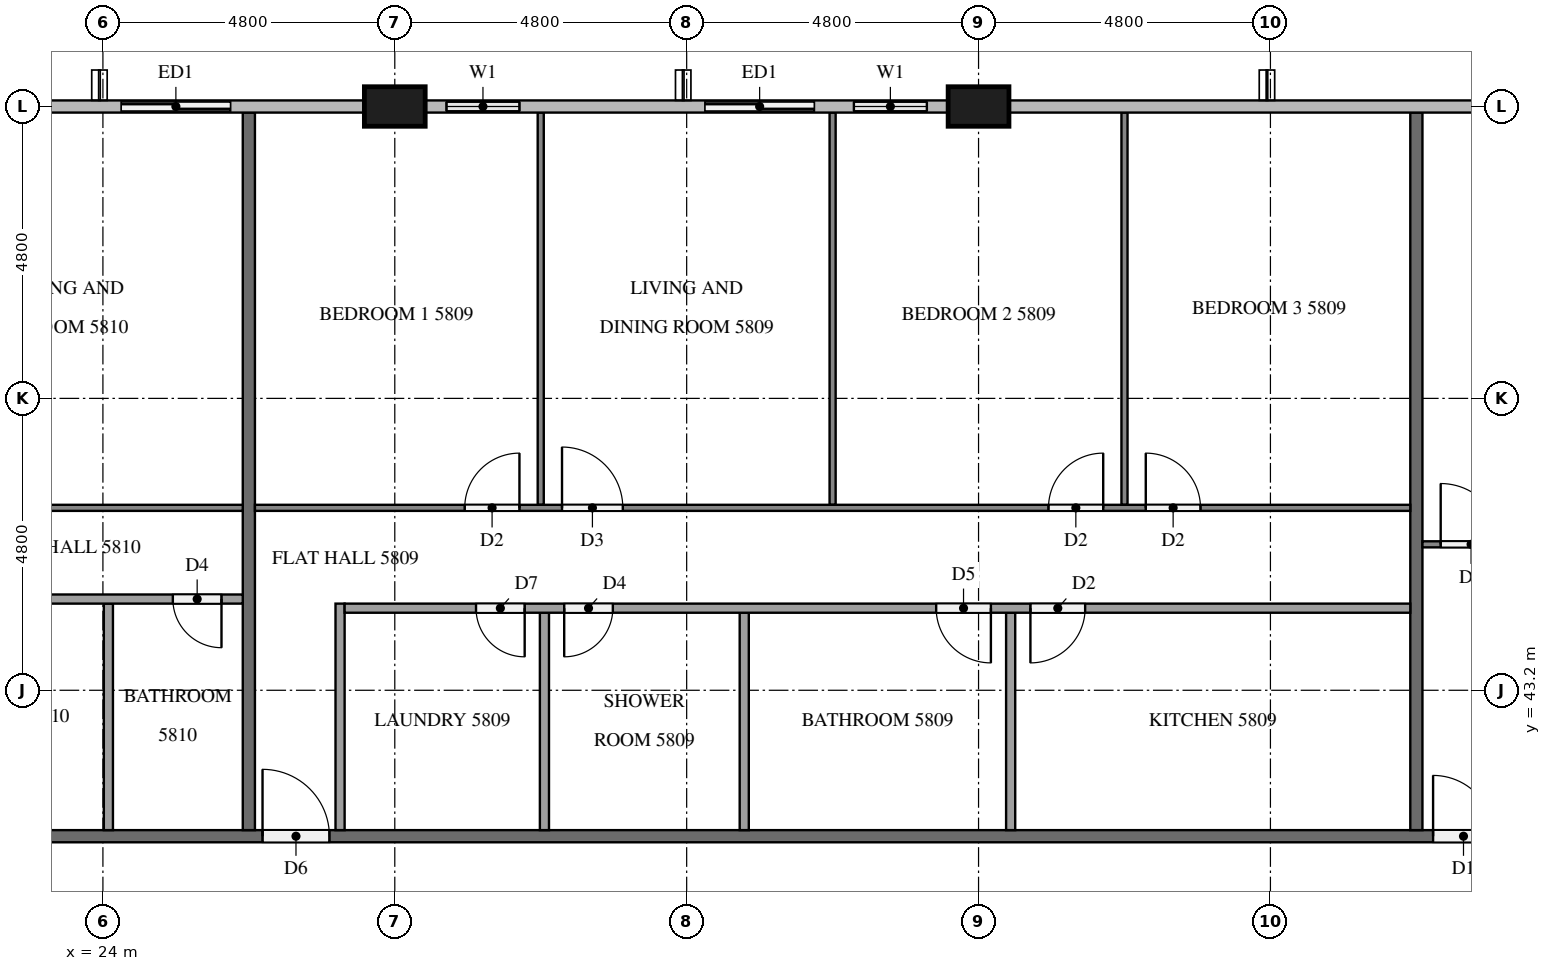
"""IFC4 building model, lengths in metres.
Left out: names, types, materials, properties, quantities, classifications, styles, units other than length and angle.
Written with IfcOpenShell. Run it as: python <this file> out.ifc"""

import sys

from ifc_helpers import new_model, si_unit, direction, frame, frame_2d, origin, origin_2d, place, context, subcontext, project, spatial, rectangle, extrude, element, fill, save


model = new_model("IFC4")
c1 = context("Model", 3, precision=1e-05, world=origin(), true_north=direction((0.0, 1.0)))
c2 = subcontext(c1, "Body", "Model", "MODEL_VIEW")
j1 = project(units=[si_unit("LENGTHUNIT", "METRE"), si_unit("PLANEANGLEUNIT", "RADIAN")], contexts=[c1])
p1 = place(None, origin())
s1 = spatial("IfcSite", under=j1, at=p1, CompositionType="ELEMENT")
p2 = place(p1, origin())
s2 = spatial("IfcBuilding", under=s1, at=p2, CompositionType="ELEMENT")
p3 = place(p2, frame((0.0, 0.0, 222.8)))
s3 = spatial("IfcBuildingStorey", under=s2, at=p3, CompositionType="ELEMENT", Elevation=222.8)
for number, where, z_axis, x_axis in (
    (1, (38.4, 52.8, 0.0), (0.0, 0.0, 1.0), (1.0, 0.0, 0.0)),
    (2, (28.8, 52.8, 0.0), (0.0, 0.0, 1.0), (1.0, 0.0, 0.0)),
):
    element("IfcColumn", number, at=place(p3, frame(where, z_axis=z_axis, x_axis=x_axis)), inside=s3, PredefinedType="COLUMN", context=c2, shape_type="SweptSolid", body=[
        extrude(rectangle(XDim=1.0, YDim=0.65, at=origin_2d()), origin(), (0.0, 0.0, 1.0), 3.2),
    ])
p4 = place(p3, frame((37.9, 52.8, 0.0), z_axis=(0.0, 0.0, 1.0), x_axis=(-1.0, 0.0, 0.0)))
e3 = element("IfcWall", 3, at=p4, inside=s3, PredefinedType="SOLIDWALL", context=c2, shape_type="SweptSolid", body=[
    extrude(rectangle(XDim=4.3, YDim=0.15, at=frame_2d((2.15, 0.0))), origin(), (0.0, 0.0, 1.0), 3.2),
])
p5 = place(p4, frame((0.35, 0.0, 0.9)))
e4 = element("IfcOpeningElement", 4, at=p5, cuts=e3, PredefinedType="OPENING", context=c2, shape_type="SweptSolid", body=[
    extrude(rectangle(XDim=1.2, YDim=1.4, at=frame_2d((0.6, 0.7))), frame((0.0, 0.085, 0.0), z_axis=(0.0, -1.0, 0.0), x_axis=(1.0, 0.0, 0.0)), (0.0, 0.0, 1.0), 0.17),
])
p6 = place(p4, frame((2.2, 0.0, 0.0)))
e5 = element("IfcOpeningElement", 5, at=p6, cuts=e3, PredefinedType="OPENING", context=c2, shape_type="SweptSolid", body=[
    extrude(rectangle(XDim=1.8, YDim=2.4, at=frame_2d((0.9, 1.2))), frame((0.0, 0.085, 0.0), z_axis=(0.0, -1.0, 0.0), x_axis=(1.0, 0.0, 0.0)), (0.0, 0.0, 1.0), 0.17),
])
p7 = place(p3, frame((31.2, 52.8, 0.0), z_axis=(0.0, 0.0, 1.0), x_axis=(-1.0, 0.0, 0.0)))
e6 = element("IfcWall", 6, at=p7, inside=s3, PredefinedType="SOLIDWALL", context=c2, shape_type="SweptSolid", body=[
    extrude(rectangle(XDim=1.9, YDim=0.15, at=frame_2d((0.95, 0.0))), origin(), (0.0, 0.0, 1.0), 3.2),
])
p8 = place(p7, frame((0.35, 0.0, 0.9)))
e7 = element("IfcOpeningElement", 7, at=p8, cuts=e6, PredefinedType="OPENING", context=c2, shape_type="SweptSolid", body=[
    extrude(rectangle(XDim=1.2, YDim=1.4, at=frame_2d((0.6, 0.7))), frame((0.0, 0.085, 0.0), z_axis=(0.0, -1.0, 0.0), x_axis=(1.0, 0.0, 0.0)), (0.0, 0.0, 1.0), 0.17),
])
p9 = place(p3, frame((26.4, 52.8, 0.0), z_axis=(0.0, 0.0, 1.0), x_axis=(-1.0, 0.0, 0.0)))
e8 = element("IfcWall", 8, at=p9, inside=s3, PredefinedType="SOLIDWALL", context=c2, shape_type="SweptSolid", body=[
    extrude(rectangle(XDim=2.4, YDim=0.15, at=frame_2d((1.2, 0.0))), origin(), (0.0, 0.0, 1.0), 3.2),
])
p10 = place(p9, frame((0.3, 0.0, 0.0)))
e9 = element("IfcOpeningElement", 9, at=p10, cuts=e8, PredefinedType="OPENING", context=c2, shape_type="SweptSolid", body=[
    extrude(rectangle(XDim=1.8, YDim=2.4, at=frame_2d((0.9, 1.2))), frame((0.0, 0.085, 0.0), z_axis=(0.0, -1.0, 0.0), x_axis=(1.0, 0.0, 0.0)), (0.0, 0.0, 1.0), 0.17),
])
p11 = place(p3, frame((11.9, 40.8, 0.0), z_axis=(0.0, 0.0, 1.0), x_axis=(1.0, 0.0, 0.0)))
e10 = element("IfcWall", 10, at=p11, inside=s3, PredefinedType="PARTITIONING", context=c2, shape_type="SweptSolid", body=[
    extrude(rectangle(XDim=38.6, YDim=0.2, at=frame_2d((19.3, 0.0))), origin(), (0.0, 0.0, 1.0), 3.2),
])
p12 = place(p11, frame((33.975, 0.0, 0.0)))
e11 = element("IfcOpeningElement", 11, at=p12, cuts=e10, PredefinedType="OPENING", context=c2, shape_type="SweptSolid", body=[
    extrude(rectangle(XDim=1.0, YDim=2.1, at=frame_2d((0.5, 1.05))), frame((0.0, 0.11, 0.0), z_axis=(0.0, -1.0, 0.0), x_axis=(1.0, 0.0, 0.0)), (0.0, 0.0, 1.0), 0.22),
])
p13 = place(p11, frame((14.725, 0.0, 0.0)))
e12 = element("IfcOpeningElement", 12, at=p13, cuts=e10, PredefinedType="OPENING", context=c2, shape_type="SweptSolid", body=[
    extrude(rectangle(XDim=1.1, YDim=2.1, at=frame_2d((0.55, 1.05))), frame((0.0, 0.11, 0.0), z_axis=(0.0, -1.0, 0.0), x_axis=(1.0, 0.0, 0.0)), (0.0, 0.0, 1.0), 0.22),
])
p14 = place(p11, frame((7.575, 0.0, 0.0)))
e13 = element("IfcOpeningElement", 13, at=p14, cuts=e10, PredefinedType="OPENING", context=c2, shape_type="SweptSolid", body=[
    extrude(rectangle(XDim=1.0, YDim=2.1, at=frame_2d((0.5, 1.05))), frame((0.0, 0.11, 0.0), z_axis=(0.0, -1.0, 0.0), x_axis=(1.0, 0.0, 0.0)), (0.0, 0.0, 1.0), 0.22),
])
p15 = place(p11, frame((6.025, 0.0, 0.0)))
e14 = element("IfcOpeningElement", 14, at=p15, cuts=e10, PredefinedType="OPENING", context=c2, shape_type="SweptSolid", body=[
    extrude(rectangle(XDim=1.0, YDim=2.1, at=frame_2d((0.5, 1.05))), frame((0.0, 0.11, 0.0), z_axis=(0.0, -1.0, 0.0), x_axis=(1.0, 0.0, 0.0)), (0.0, 0.0, 1.0), 0.22),
])
for number, where, z_axis, x_axis in (
    (15, (45.6, 52.7, 0.0), (0.0, 0.0, 1.0), (0.0, -1.0, 0.0)),
    (16, (26.4, 52.7, 0.0), (0.0, 0.0, 1.0), (0.0, -1.0, 0.0)),
):
    element("IfcWall", number, at=place(p3, frame(where, z_axis=z_axis, x_axis=x_axis)), inside=s3, PredefinedType="PARTITIONING", context=c2, shape_type="SweptSolid", body=[
        extrude(rectangle(XDim=11.8, YDim=0.2, at=frame_2d((5.9, 0.0))), origin(), (0.0, 0.0, 1.0), 3.2),
    ])
p16 = place(p3, frame((45.7, 45.6, 0.0), z_axis=(0.0, 0.0, 1.0), x_axis=(1.0, 0.0, 0.0)))
e17 = element("IfcWall", 17, at=p16, inside=s3, PredefinedType="PARTITIONING", context=c2, shape_type="SweptSolid", body=[
    extrude(rectangle(XDim=16.6, YDim=0.1, at=frame_2d((8.3, 0.0))), origin(), (0.0, 0.0, 1.0), 3.2),
])
p17 = place(p16, frame((0.3, 0.0, 0.0)))
e18 = element("IfcOpeningElement", 18, at=p17, cuts=e17, PredefinedType="OPENING", context=c2, shape_type="SweptSolid", body=[
    extrude(rectangle(XDim=1.0, YDim=2.1, at=frame_2d((0.5, 1.05))), frame((0.0, 0.06, 0.0), z_axis=(0.0, -1.0, 0.0), x_axis=(1.0, 0.0, 0.0)), (0.0, 0.0, 1.0), 0.12),
])
p18 = place(p16, frame((10.65, 0.0, 0.0)))
e19 = element("IfcOpeningElement", 19, at=p18, cuts=e17, PredefinedType="OPENING", context=c2, shape_type="SweptSolid", body=[
    extrude(rectangle(XDim=0.9, YDim=2.1, at=frame_2d((0.45, 1.05))), frame((0.0, 0.06, 0.0), z_axis=(0.0, -1.0, 0.0), x_axis=(1.0, 0.0, 0.0)), (0.0, 0.0, 1.0), 0.12),
])
p19 = place(p16, frame((12.25, 0.0, 0.0)))
e20 = element("IfcOpeningElement", 20, at=p19, cuts=e17, PredefinedType="OPENING", context=c2, shape_type="SweptSolid", body=[
    extrude(rectangle(XDim=0.9, YDim=2.1, at=frame_2d((0.45, 1.05))), frame((0.0, 0.06, 0.0), z_axis=(0.0, -1.0, 0.0), x_axis=(1.0, 0.0, 0.0)), (0.0, 0.0, 1.0), 0.12),
])
for number, where, z_axis, x_axis in (
    (21, (31.2, 46.25, 0.0), (0.0, 0.0, 1.0), (0.0, 1.0, 0.0)),
    (22, (36.0, 46.25, 0.0), (0.0, 0.0, 1.0), (0.0, 1.0, 0.0)),
    (23, (40.8, 46.25, 0.0), (0.0, 0.0, 1.0), (0.0, 1.0, 0.0)),
):
    element("IfcWall", number, at=place(p3, frame(where, z_axis=z_axis, x_axis=x_axis)), inside=s3, PredefinedType="PARTITIONING", context=c2, shape_type="SweptSolid", body=[
        extrude(rectangle(XDim=6.45, YDim=0.1, at=frame_2d((3.225, 0.0))), origin(), (0.0, 0.0, 1.0), 3.2),
    ])
p20 = place(p3, frame((26.5, 46.2, 0.0), z_axis=(0.0, 0.0, 1.0), x_axis=(1.0, 0.0, 0.0)))
e24 = element("IfcWall", 24, at=p20, inside=s3, PredefinedType="PARTITIONING", context=c2, shape_type="SweptSolid", body=[
    extrude(rectangle(XDim=19.0, YDim=0.1, at=frame_2d((9.5, 0.0))), origin(), (0.0, 0.0, 1.0), 3.2),
])
p21 = place(p20, frame((3.45, 0.0, 0.0)))
e25 = element("IfcOpeningElement", 25, at=p21, cuts=e24, PredefinedType="OPENING", context=c2, shape_type="SweptSolid", body=[
    extrude(rectangle(XDim=0.9, YDim=2.1, at=frame_2d((0.45, 1.05))), frame((0.0, 0.06, 0.0), z_axis=(0.0, -1.0, 0.0), x_axis=(1.0, 0.0, 0.0)), (0.0, 0.0, 1.0), 0.12),
])
p22 = place(p20, frame((5.05, 0.0, 0.0)))
e26 = element("IfcOpeningElement", 26, at=p22, cuts=e24, PredefinedType="OPENING", context=c2, shape_type="SweptSolid", body=[
    extrude(rectangle(XDim=1.0, YDim=2.1, at=frame_2d((0.5, 1.05))), frame((0.0, 0.06, 0.0), z_axis=(0.0, -1.0, 0.0), x_axis=(1.0, 0.0, 0.0)), (0.0, 0.0, 1.0), 0.12),
])
p23 = place(p20, frame((13.05, 0.0, 0.0)))
e27 = element("IfcOpeningElement", 27, at=p23, cuts=e24, PredefinedType="OPENING", context=c2, shape_type="SweptSolid", body=[
    extrude(rectangle(XDim=0.9, YDim=2.1, at=frame_2d((0.45, 1.05))), frame((0.0, 0.06, 0.0), z_axis=(0.0, -1.0, 0.0), x_axis=(1.0, 0.0, 0.0)), (0.0, 0.0, 1.0), 0.12),
])
p24 = place(p20, frame((14.65, 0.0, 0.0)))
e28 = element("IfcOpeningElement", 28, at=p24, cuts=e24, PredefinedType="OPENING", context=c2, shape_type="SweptSolid", body=[
    extrude(rectangle(XDim=0.9, YDim=2.1, at=frame_2d((0.45, 1.05))), frame((0.0, 0.06, 0.0), z_axis=(0.0, -1.0, 0.0), x_axis=(1.0, 0.0, 0.0)), (0.0, 0.0, 1.0), 0.12),
])
for number, where, z_axis, x_axis in (
    (29, (31.261, 40.9, 0.0), (0.0, 0.0, 1.0), (0.0, 1.0, 0.0)),
    (30, (34.547, 40.9, 0.0), (0.0, 0.0, 1.0), (0.0, 1.0, 0.0)),
    (31, (38.928, 40.9, 0.0), (0.0, 0.0, 1.0), (0.0, 1.0, 0.0)),
):
    element("IfcWall", number, at=place(p3, frame(where, z_axis=z_axis, x_axis=x_axis)), inside=s3, PredefinedType="PARTITIONING", context=c2, shape_type="SweptSolid", body=[
        extrude(rectangle(XDim=3.575, YDim=0.15, at=frame_2d((1.788, 0.0))), origin(), (0.0, 0.0, 1.0), 3.2),
    ])
p25 = place(p3, frame((27.9, 40.9, 0.0), z_axis=(0.0, 0.0, 1.0), x_axis=(0.0, 1.0, 0.0)))
e32 = element("IfcWall", 32, at=p25, inside=s3, PredefinedType="PARTITIONING", context=c2, shape_type="SweptSolid", body=[
    extrude(rectangle(XDim=3.725, YDim=0.15, at=frame_2d((1.863, 0.0))), origin(), (0.0, 0.0, 1.0), 3.2),
])
p26 = place(p3, frame((45.5, 44.55, 0.0), z_axis=(0.0, 0.0, 1.0), x_axis=(-1.0, 0.0, 0.0)))
e33 = element("IfcWall", 33, at=p26, inside=s3, PredefinedType="PARTITIONING", context=c2, shape_type="SweptSolid", body=[
    extrude(rectangle(XDim=17.525, YDim=0.15, at=frame_2d((8.762, 0.0))), origin(), (0.0, 0.0, 1.0), 3.2),
])
p27 = place(p26, frame((14.564, 0.0, 0.0)))
e34 = element("IfcOpeningElement", 34, at=p27, cuts=e33, PredefinedType="OPENING", context=c2, shape_type="SweptSolid", body=[
    extrude(rectangle(XDim=0.8, YDim=2.1, at=frame_2d((0.4, 1.05))), frame((0.0, 0.085, 0.0), z_axis=(0.0, -1.0, 0.0), x_axis=(1.0, 0.0, 0.0)), (0.0, 0.0, 1.0), 0.17),
])
p28 = place(p26, frame((13.114, 0.0, 0.0)))
e35 = element("IfcOpeningElement", 35, at=p28, cuts=e33, PredefinedType="OPENING", context=c2, shape_type="SweptSolid", body=[
    extrude(rectangle(XDim=0.8, YDim=2.1, at=frame_2d((0.4, 1.05))), frame((0.0, 0.085, 0.0), z_axis=(0.0, -1.0, 0.0), x_axis=(1.0, 0.0, 0.0)), (0.0, 0.0, 1.0), 0.17),
])
p29 = place(p26, frame((6.897, 0.0, 0.0)))
e36 = element("IfcOpeningElement", 36, at=p29, cuts=e33, PredefinedType="OPENING", context=c2, shape_type="SweptSolid", body=[
    extrude(rectangle(XDim=0.9, YDim=2.1, at=frame_2d((0.45, 1.05))), frame((0.0, 0.085, 0.0), z_axis=(0.0, -1.0, 0.0), x_axis=(1.0, 0.0, 0.0)), (0.0, 0.0, 1.0), 0.17),
])
p30 = place(p26, frame((5.347, 0.0, 0.0)))
e37 = element("IfcOpeningElement", 37, at=p30, cuts=e33, PredefinedType="OPENING", context=c2, shape_type="SweptSolid", body=[
    extrude(rectangle(XDim=0.9, YDim=2.1, at=frame_2d((0.45, 1.05))), frame((0.0, 0.085, 0.0), z_axis=(0.0, -1.0, 0.0), x_axis=(1.0, 0.0, 0.0)), (0.0, 0.0, 1.0), 0.17),
])
p31 = place(p3, frame((19.3, 46.2, 0.0), z_axis=(0.0, 0.0, 1.0), x_axis=(1.0, 0.0, 0.0)))
e38 = element("IfcWall", 38, at=p31, inside=s3, PredefinedType="PARTITIONING", context=c2, shape_type="SweptSolid", body=[
    extrude(rectangle(XDim=7.0, YDim=0.1, at=frame_2d((3.5, 0.0))), origin(), (0.0, 0.0, 1.0), 3.2),
])
p32 = place(p31, frame((0.3, 0.0, 0.0)))
e39 = element("IfcOpeningElement", 39, at=p32, cuts=e38, PredefinedType="OPENING", context=c2, shape_type="SweptSolid", body=[
    extrude(rectangle(XDim=1.0, YDim=2.1, at=frame_2d((0.5, 1.05))), frame((0.0, 0.06, 0.0), z_axis=(0.0, -1.0, 0.0), x_axis=(1.0, 0.0, 0.0)), (0.0, 0.0, 1.0), 0.12),
])
p33 = place(p3, frame((24.09, 40.9, 0.0), z_axis=(0.0, 0.0, 1.0), x_axis=(0.0, 1.0, 0.0)))
e40 = element("IfcWall", 40, at=p33, inside=s3, PredefinedType="PARTITIONING", context=c2, shape_type="SweptSolid", body=[
    extrude(rectangle(XDim=3.725, YDim=0.15, at=frame_2d((1.863, 0.0))), origin(), (0.0, 0.0, 1.0), 3.2),
])
p34 = place(p3, frame((26.3, 44.7, 0.0), z_axis=(0.0, 0.0, 1.0), x_axis=(-1.0, 0.0, 0.0)))
e41 = element("IfcWall", 41, at=p34, inside=s3, PredefinedType="PARTITIONING", context=c2, shape_type="SweptSolid", body=[
    extrude(rectangle(XDim=5.525, YDim=0.15, at=frame_2d((2.763, 0.0))), origin(), (0.0, 0.0, 1.0), 3.2),
])
p35 = place(p34, frame((4.325, 0.0, 0.0)))
e42 = element("IfcOpeningElement", 42, at=p35, cuts=e41, PredefinedType="OPENING", context=c2, shape_type="SweptSolid", body=[
    extrude(rectangle(XDim=0.9, YDim=2.1, at=frame_2d((0.45, 1.05))), frame((0.0, 0.085, 0.0), z_axis=(0.0, -1.0, 0.0), x_axis=(1.0, 0.0, 0.0)), (0.0, 0.0, 1.0), 0.17),
])
p36 = place(p34, frame((0.35, 0.0, 0.0)))
e43 = element("IfcOpeningElement", 43, at=p36, cuts=e41, PredefinedType="OPENING", context=c2, shape_type="SweptSolid", body=[
    extrude(rectangle(XDim=0.8, YDim=2.1, at=frame_2d((0.4, 1.05))), frame((0.0, 0.085, 0.0), z_axis=(0.0, -1.0, 0.0), x_axis=(1.0, 0.0, 0.0)), (0.0, 0.0, 1.0), 0.17),
])
p37 = place(p5, origin())
e44 = element("IfcWindow", 44, at=p37, inside=s3, PartitioningType="SINGLE_PANEL", PredefinedType="WINDOW", context=c2, shape_type="SweptSolid", body=[
    extrude(rectangle(XDim=1.2, YDim=1.4, at=frame_2d((0.6, 0.7))), frame((0.0, 0.03, 0.0), z_axis=(0.0, -1.0, 0.0), x_axis=(1.0, 0.0, 0.0)), (0.0, 0.0, 1.0), 0.06),
])
fill(e4, e44)
p38 = place(p6, origin())
e45 = element("IfcDoor", 45, at=p38, inside=s3, OperationType="SLIDING_TO_LEFT", PredefinedType="DOOR", context=c2, shape_type="SweptSolid", body=[
    extrude(rectangle(XDim=1.8, YDim=2.4, at=frame_2d((0.9, 1.2))), frame((0.0, 0.025, 0.0), z_axis=(0.0, -1.0, 0.0), x_axis=(1.0, 0.0, 0.0)), (0.0, 0.0, 1.0), 0.05),
])
fill(e5, e45)
p39 = place(p8, origin())
e46 = element("IfcWindow", 46, at=p39, inside=s3, PartitioningType="SINGLE_PANEL", PredefinedType="WINDOW", context=c2, shape_type="SweptSolid", body=[
    extrude(rectangle(XDim=1.2, YDim=1.4, at=frame_2d((0.6, 0.7))), frame((0.0, 0.03, 0.0), z_axis=(0.0, -1.0, 0.0), x_axis=(1.0, 0.0, 0.0)), (0.0, 0.0, 1.0), 0.06),
])
fill(e7, e46)
p40 = place(p10, origin())
e47 = element("IfcDoor", 47, at=p40, inside=s3, OperationType="SLIDING_TO_RIGHT", PredefinedType="DOOR", context=c2, shape_type="SweptSolid", body=[
    extrude(rectangle(XDim=1.8, YDim=2.4, at=frame_2d((0.9, 1.2))), frame((0.0, 0.025, 0.0), z_axis=(0.0, -1.0, 0.0), x_axis=(1.0, 0.0, 0.0)), (0.0, 0.0, 1.0), 0.05),
])
fill(e9, e47)
p41 = place(p12, origin())
e48 = element("IfcDoor", 48, at=p41, inside=s3, OperationType="SINGLE_SWING_LEFT", PredefinedType="DOOR", context=c2, shape_type="SweptSolid", body=[
    extrude(rectangle(XDim=1.0, YDim=2.1, at=frame_2d((0.5, 1.05))), frame((0.0, 0.025, 0.0), z_axis=(0.0, -1.0, 0.0), x_axis=(1.0, 0.0, 0.0)), (0.0, 0.0, 1.0), 0.05),
])
fill(e11, e48)
p42 = place(p13, origin())
e49 = element("IfcDoor", 49, at=p42, inside=s3, OperationType="SINGLE_SWING_LEFT", PredefinedType="DOOR", context=c2, shape_type="SweptSolid", body=[
    extrude(rectangle(XDim=1.1, YDim=2.1, at=frame_2d((0.55, 1.05))), frame((0.0, 0.025, 0.0), z_axis=(0.0, -1.0, 0.0), x_axis=(1.0, 0.0, 0.0)), (0.0, 0.0, 1.0), 0.05),
])
fill(e12, e49)
p43 = place(p17, origin())
e50 = element("IfcDoor", 50, at=p43, inside=s3, OperationType="SINGLE_SWING_LEFT", PredefinedType="DOOR", context=c2, shape_type="SweptSolid", body=[
    extrude(rectangle(XDim=1.0, YDim=2.1, at=frame_2d((0.5, 1.05))), frame((0.0, 0.025, 0.0), z_axis=(0.0, -1.0, 0.0), x_axis=(1.0, 0.0, 0.0)), (0.0, 0.0, 1.0), 0.05),
])
fill(e18, e50)
p44 = place(p21, origin())
e51 = element("IfcDoor", 51, at=p44, inside=s3, OperationType="SINGLE_SWING_RIGHT", PredefinedType="DOOR", context=c2, shape_type="SweptSolid", body=[
    extrude(rectangle(XDim=0.9, YDim=2.1, at=frame_2d((0.45, 1.05))), frame((0.0, 0.025, 0.0), z_axis=(0.0, -1.0, 0.0), x_axis=(1.0, 0.0, 0.0)), (0.0, 0.0, 1.0), 0.05),
])
fill(e25, e51)
p45 = place(p22, origin())
e52 = element("IfcDoor", 52, at=p45, inside=s3, OperationType="SINGLE_SWING_LEFT", PredefinedType="DOOR", context=c2, shape_type="SweptSolid", body=[
    extrude(rectangle(XDim=1.0, YDim=2.1, at=frame_2d((0.5, 1.05))), frame((0.0, 0.025, 0.0), z_axis=(0.0, -1.0, 0.0), x_axis=(1.0, 0.0, 0.0)), (0.0, 0.0, 1.0), 0.05),
])
fill(e26, e52)
p46 = place(p23, origin())
e53 = element("IfcDoor", 53, at=p46, inside=s3, OperationType="SINGLE_SWING_RIGHT", PredefinedType="DOOR", context=c2, shape_type="SweptSolid", body=[
    extrude(rectangle(XDim=0.9, YDim=2.1, at=frame_2d((0.45, 1.05))), frame((0.0, 0.025, 0.0), z_axis=(0.0, -1.0, 0.0), x_axis=(1.0, 0.0, 0.0)), (0.0, 0.0, 1.0), 0.05),
])
fill(e27, e53)
p47 = place(p24, origin())
e54 = element("IfcDoor", 54, at=p47, inside=s3, OperationType="SINGLE_SWING_LEFT", PredefinedType="DOOR", context=c2, shape_type="SweptSolid", body=[
    extrude(rectangle(XDim=0.9, YDim=2.1, at=frame_2d((0.45, 1.05))), frame((0.0, 0.025, 0.0), z_axis=(0.0, -1.0, 0.0), x_axis=(1.0, 0.0, 0.0)), (0.0, 0.0, 1.0), 0.05),
])
fill(e28, e54)
p48 = place(p27, origin())
e55 = element("IfcDoor", 55, at=p48, inside=s3, OperationType="SINGLE_SWING_LEFT", PredefinedType="DOOR", context=c2, shape_type="SweptSolid", body=[
    extrude(rectangle(XDim=0.8, YDim=2.1, at=frame_2d((0.4, 1.05))), frame((0.0, 0.025, 0.0), z_axis=(0.0, -1.0, 0.0), x_axis=(1.0, 0.0, 0.0)), (0.0, 0.0, 1.0), 0.05),
])
fill(e34, e55)
p49 = place(p28, origin())
e56 = element("IfcDoor", 56, at=p49, inside=s3, OperationType="SINGLE_SWING_RIGHT", PredefinedType="DOOR", context=c2, shape_type="SweptSolid", body=[
    extrude(rectangle(XDim=0.8, YDim=2.1, at=frame_2d((0.4, 1.05))), frame((0.0, 0.025, 0.0), z_axis=(0.0, -1.0, 0.0), x_axis=(1.0, 0.0, 0.0)), (0.0, 0.0, 1.0), 0.05),
])
fill(e35, e56)
p50 = place(p29, origin())
e57 = element("IfcDoor", 57, at=p50, inside=s3, OperationType="SINGLE_SWING_LEFT", PredefinedType="DOOR", context=c2, shape_type="SweptSolid", body=[
    extrude(rectangle(XDim=0.9, YDim=2.1, at=frame_2d((0.45, 1.05))), frame((0.0, 0.025, 0.0), z_axis=(0.0, -1.0, 0.0), x_axis=(1.0, 0.0, 0.0)), (0.0, 0.0, 1.0), 0.05),
])
fill(e36, e57)
p51 = place(p30, origin())
e58 = element("IfcDoor", 58, at=p51, inside=s3, OperationType="SINGLE_SWING_RIGHT", PredefinedType="DOOR", context=c2, shape_type="SweptSolid", body=[
    extrude(rectangle(XDim=0.9, YDim=2.1, at=frame_2d((0.45, 1.05))), frame((0.0, 0.025, 0.0), z_axis=(0.0, -1.0, 0.0), x_axis=(1.0, 0.0, 0.0)), (0.0, 0.0, 1.0), 0.05),
])
fill(e37, e58)
p52 = place(p36, origin())
e59 = element("IfcDoor", 59, at=p52, inside=s3, OperationType="SINGLE_SWING_LEFT", PredefinedType="DOOR", context=c2, shape_type="SweptSolid", body=[
    extrude(rectangle(XDim=0.8, YDim=2.1, at=frame_2d((0.4, 1.05))), frame((0.0, 0.025, 0.0), z_axis=(0.0, -1.0, 0.0), x_axis=(1.0, 0.0, 0.0)), (0.0, 0.0, 1.0), 0.05),
])
fill(e43, e59)
save(model, sys.argv[1])
